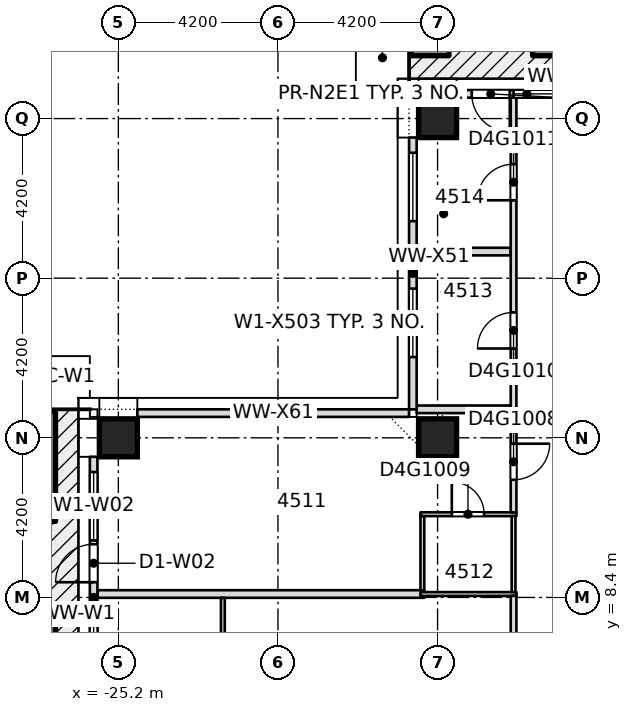
"""IFC4 building model, lengths in metres.
Left out: names, types, materials, properties, quantities, classifications, styles, units other than length and angle.
Written with IfcOpenShell. Run it as: python <this file> out.ifc"""

import sys

from ifc_helpers import new_model, si_unit, direction, frame, frame_2d, origin, origin_2d, place, context, subcontext, project, spatial, rectangle, extrude, element, fill, save


model = new_model("IFC4")
c1 = context("Model", 3, precision=1e-05, world=origin(), true_north=direction((0.0, 1.0)))
c2 = subcontext(c1, "Body", "Model", "MODEL_VIEW")
j1 = project(units=[si_unit("LENGTHUNIT", "METRE"), si_unit("PLANEANGLEUNIT", "RADIAN")], contexts=[c1])
p1 = place(None, origin())
s1 = spatial("IfcSite", under=j1, at=p1, CompositionType="ELEMENT")
p2 = place(p1, origin())
s2 = spatial("IfcBuilding", under=s1, at=p2, CompositionType="ELEMENT")
p3 = place(p2, frame((0.0, 0.0, 175.55)))
s3 = spatial("IfcBuildingStorey", under=s2, at=p3, CompositionType="ELEMENT", Elevation=175.55)
for number, where, z_axis, x_axis in (
    (1, (-25.2, 12.6, -0.4), (0.0, 0.0, 1.0), (1.0, 0.0, 0.0)),
    (2, (-16.8, 12.6, -0.4), (0.0, 0.0, 1.0), (1.0, 0.0, 0.0)),
    (3, (-16.8, 21.0, -0.4), (0.0, 0.0, 1.0), (1.0, 0.0, 0.0)),
):
    element("IfcColumn", number, at=place(p3, frame(where, z_axis=z_axis, x_axis=x_axis)), inside=s3, PredefinedType="COLUMN", context=c2, shape_type="SweptSolid", body=[
        extrude(rectangle(XDim=1.0, YDim=1.0, at=origin_2d()), origin(), (0.0, 0.0, 1.0), 3.45),
    ])
p4 = place(p3, frame((-25.75, 8.49, 0.0), z_axis=(0.0, 0.0, 1.0), x_axis=(1.0, 0.0, 0.0)))
e4 = element("IfcWall", 4, at=p4, inside=s3, PredefinedType="PARTITIONING", context=c2, shape_type="SweptSolid", body=[
    extrude(rectangle(XDim=8.6, YDim=0.2, at=frame_2d((4.3, 0.0))), origin(), (0.0, 0.0, 1.0), 3.05),
])
p5 = place(p3, frame((-17.25, 8.49, 0.0), z_axis=(0.0, 0.0, 1.0), x_axis=(1.0, 0.0, 0.0)))
e5 = element("IfcWall", 5, at=p5, inside=s3, PredefinedType="PARTITIONING", context=c2, shape_type="SweptSolid", body=[
    extrude(rectangle(XDim=2.525, YDim=0.1, at=frame_2d((1.262, 0.0))), origin(), (0.0, 0.0, 1.0), 3.05),
])
p6 = place(p3, frame((-17.25, 10.59, 0.0), z_axis=(0.0, 0.0, 1.0), x_axis=(1.0, 0.0, 0.0)))
e6 = element("IfcWall", 6, at=p6, inside=s3, PredefinedType="PARTITIONING", context=c2, shape_type="SweptSolid", body=[
    extrude(rectangle(XDim=2.525, YDim=0.1, at=frame_2d((1.262, 0.0))), origin(), (0.0, 0.0, 1.0), 3.05),
])
p7 = place(p6, frame((0.825, 0.0, 0.0)))
e7 = element("IfcOpeningElement", 7, at=p7, cuts=e6, PredefinedType="OPENING", context=c2, shape_type="SweptSolid", body=[
    extrude(rectangle(XDim=0.85, YDim=2.1, at=frame_2d((0.425, 1.05))), frame((0.0, 0.06, 0.0), z_axis=(0.0, -1.0, 0.0), x_axis=(1.0, 0.0, 0.0)), (0.0, 0.0, 1.0), 0.12),
])
for number, where, z_axis, x_axis in (
    (8, (-17.35, 13.35, 0.0), (0.0, 0.0, 1.0), (1.0, 0.0, 0.0)),
    (9, (-17.35, 17.5, 0.0), (0.0, 0.0, 1.0), (1.0, 0.0, 0.0)),
):
    element("IfcWall", number, at=place(p3, frame(where, z_axis=z_axis, x_axis=x_axis)), inside=s3, PredefinedType="PARTITIONING", context=c2, shape_type="SweptSolid", body=[
        extrude(rectangle(XDim=2.475, YDim=0.2, at=frame_2d((1.238, 0.0))), origin(), (0.0, 0.0, 1.0), 3.05),
    ])
p8 = place(p3, frame((-22.45, 5.0, 0.0), z_axis=(0.0, 0.0, 1.0), x_axis=(0.0, 1.0, 0.0)))
e10 = element("IfcWall", 10, at=p8, inside=s3, PredefinedType="PARTITIONING", context=c2, shape_type="SweptSolid", body=[
    extrude(rectangle(XDim=3.39, YDim=0.1, at=frame_2d((1.695, 0.0))), origin(), (0.0, 0.0, 1.0), 3.05),
])
p9 = place(p3, frame((-17.2, 8.59, 0.0), z_axis=(0.0, 0.0, 1.0), x_axis=(0.0, 1.0, 0.0)))
e11 = element("IfcWall", 11, at=p9, inside=s3, PredefinedType="PARTITIONING", context=c2, shape_type="SweptSolid", body=[
    extrude(rectangle(XDim=1.95, YDim=0.1, at=frame_2d((0.975, 0.0))), origin(), (0.0, 0.0, 1.0), 3.05),
])
p10 = place(p3, frame((-14.8, -10.525, 0.0), z_axis=(0.0, 0.0, 1.0), x_axis=(0.0, 1.0, 0.0)))
e12 = element("IfcWall", 12, at=p10, inside=s3, PredefinedType="PARTITIONING", context=c2, shape_type="SweptSolid", body=[
    extrude(rectangle(XDim=18.965, YDim=0.15, at=frame_2d((9.482, 0.0))), origin(), (0.0, 0.0, 1.0), 3.05),
])
p11 = place(p10, frame((0.925, 0.0, 0.0)))
e13 = element("IfcOpeningElement", 13, at=p11, cuts=e12, PredefinedType="OPENING", context=c2, shape_type="SweptSolid", body=[
    extrude(rectangle(XDim=1.0, YDim=2.1, at=frame_2d((0.5, 1.05))), frame((0.0, 0.085, 0.0), z_axis=(0.0, -1.0, 0.0), x_axis=(1.0, 0.0, 0.0)), (0.0, 0.0, 1.0), 0.17),
])
p12 = place(p10, frame((15.97, 0.0, 0.0)))
e14 = element("IfcOpeningElement", 14, at=p12, cuts=e12, PredefinedType="OPENING", context=c2, shape_type="SweptSolid", body=[
    extrude(rectangle(XDim=1.0, YDim=2.1, at=frame_2d((0.5, 1.05))), frame((0.0, 0.085, 0.0), z_axis=(0.0, -1.0, 0.0), x_axis=(1.0, 0.0, 0.0)), (0.0, 0.0, 1.0), 0.17),
])
p13 = place(p10, frame((9.975, 0.0, 0.0)))
e15 = element("IfcOpeningElement", 15, at=p13, cuts=e12, PredefinedType="OPENING", context=c2, shape_type="SweptSolid", body=[
    extrude(rectangle(XDim=1.1, YDim=2.1, at=frame_2d((0.55, 1.05))), frame((0.0, 0.085, 0.0), z_axis=(0.0, -1.0, 0.0), x_axis=(1.0, 0.0, 0.0)), (0.0, 0.0, 1.0), 0.17),
])
p14 = place(p10, frame((4.825, 0.0, 0.0)))
e16 = element("IfcOpeningElement", 16, at=p14, cuts=e12, PredefinedType="OPENING", context=c2, shape_type="SweptSolid", body=[
    extrude(rectangle(XDim=1.0, YDim=2.1, at=frame_2d((0.5, 1.05))), frame((0.0, 0.085, 0.0), z_axis=(0.0, -1.0, 0.0), x_axis=(1.0, 0.0, 0.0)), (0.0, 0.0, 1.0), 0.17),
])
p15 = place(p3, frame((-14.8, 8.54, 0.0), z_axis=(0.0, 0.0, 1.0), x_axis=(0.0, 1.0, 0.0)))
e17 = element("IfcWall", 17, at=p15, inside=s3, PredefinedType="PARTITIONING", context=c2, shape_type="SweptSolid", body=[
    extrude(rectangle(XDim=2.0, YDim=0.1, at=frame_2d((1.0, 0.0))), origin(), (0.0, 0.0, 1.0), 3.05),
])
p16 = place(p3, frame((-14.8, 10.64, 0.0), z_axis=(0.0, 0.0, 1.0), x_axis=(0.0, 1.0, 0.0)))
e18 = element("IfcWall", 18, at=p16, inside=s3, PredefinedType="PARTITIONING", context=c2, shape_type="SweptSolid", body=[
    extrude(rectangle(XDim=10.91, YDim=0.15, at=frame_2d((5.455, 0.0))), origin(), (0.0, 0.0, 1.0), 3.05),
])
p17 = place(p16, frame((0.855, 0.0, 0.0)))
e19 = element("IfcOpeningElement", 19, at=p17, cuts=e18, PredefinedType="OPENING", context=c2, shape_type="SweptSolid", body=[
    extrude(rectangle(XDim=0.95, YDim=2.1, at=frame_2d((0.475, 1.05))), frame((0.0, 0.085, 0.0), z_axis=(0.0, -1.0, 0.0), x_axis=(1.0, 0.0, 0.0)), (0.0, 0.0, 1.0), 0.17),
])
p18 = place(p16, frame((4.31, 0.0, 0.0)))
e20 = element("IfcOpeningElement", 20, at=p18, cuts=e18, PredefinedType="OPENING", context=c2, shape_type="SweptSolid", body=[
    extrude(rectangle(XDim=0.95, YDim=2.1, at=frame_2d((0.475, 1.05))), frame((0.0, 0.085, 0.0), z_axis=(0.0, -1.0, 0.0), x_axis=(1.0, 0.0, 0.0)), (0.0, 0.0, 1.0), 0.17),
])
p19 = place(p16, frame((8.21, 0.0, 0.0)))
e21 = element("IfcOpeningElement", 21, at=p19, cuts=e18, PredefinedType="OPENING", context=c2, shape_type="SweptSolid", body=[
    extrude(rectangle(XDim=0.95, YDim=2.1, at=frame_2d((0.475, 1.05))), frame((0.0, 0.085, 0.0), z_axis=(0.0, -1.0, 0.0), x_axis=(1.0, 0.0, 0.0)), (0.0, 0.0, 1.0), 0.17),
])
p20 = place(p3, frame((-12.6, 21.65, 0.0), z_axis=(0.0, 0.0, 1.0), x_axis=(-1.0, 0.0, 0.0)))
e22 = element("IfcWall", 22, at=p20, inside=s3, PredefinedType="STANDARD", context=c2, shape_type="SweptSolid", body=[
    extrude(rectangle(XDim=3.7, YDim=0.2, at=frame_2d((1.85, 0.0))), origin(), (0.0, 0.0, 1.0), 3.05),
])
p21 = place(p20, frame((0.4, 0.0, 0.2)))
e23 = element("IfcOpeningElement", 23, at=p21, cuts=e22, PredefinedType="OPENING", context=c2, shape_type="SweptSolid", body=[
    extrude(rectangle(XDim=1.8, YDim=2.65, at=frame_2d((0.9, 1.325))), frame((0.0, 0.11, 0.0), z_axis=(0.0, -1.0, 0.0), x_axis=(1.0, 0.0, 0.0)), (0.0, 0.0, 1.0), 0.22),
])
p22 = place(p20, frame((2.3, 0.0, 0.0)))
e24 = element("IfcOpeningElement", 24, at=p22, cuts=e22, PredefinedType="OPENING", context=c2, shape_type="SweptSolid", body=[
    extrude(rectangle(XDim=1.0, YDim=2.4, at=frame_2d((0.5, 1.2))), frame((0.0, 0.11, 0.0), z_axis=(0.0, -1.0, 0.0), x_axis=(1.0, 0.0, 0.0)), (0.0, 0.0, 1.0), 0.22),
])
p23 = place(p3, frame((-12.66, 22.954, -0.04), z_axis=(0.0, 0.0, 1.0), x_axis=(-1.0, 0.0, 0.0)))
e25 = element("IfcWall", 25, at=p23, inside=s3, PredefinedType="USERDEFINED", context=c2, shape_type="SweptSolid", body=[
    extrude(rectangle(XDim=1.64, YDim=0.6, at=frame_2d((0.82, 0.0))), origin(), (0.0, 0.0, 1.0), 1.2),
])
p24 = place(p3, frame((-16.5, 22.954, -0.04), z_axis=(0.0, 0.0, 1.0), x_axis=(-1.0, 0.0, 0.0)))
e26 = element("IfcWall", 26, at=p24, inside=s3, PredefinedType="USERDEFINED", context=c2, shape_type="SweptSolid", body=[
    extrude(rectangle(XDim=0.99, YDim=0.6, at=frame_2d((0.495, 0.0))), origin(), (0.0, 0.0, 1.0), 1.2),
])
p25 = place(p3, frame((-17.45, 20.5, 0.0), z_axis=(0.0, 0.0, 1.0), x_axis=(0.0, -1.0, 0.0)))
e27 = element("IfcWall", 27, at=p25, inside=s3, PredefinedType="STANDARD", context=c2, shape_type="SweptSolid", body=[
    extrude(rectangle(XDim=7.15, YDim=0.2, at=frame_2d((3.575, 0.0))), origin(), (0.0, 0.0, 1.0), 3.05),
])
p26 = place(p25, frame((3.975, 0.0, 0.2)))
e28 = element("IfcOpeningElement", 28, at=p26, cuts=e27, PredefinedType="OPENING", context=c2, shape_type="SweptSolid", body=[
    extrude(rectangle(XDim=1.8, YDim=2.65, at=frame_2d((0.9, 1.325))), frame((0.0, 0.11, 0.0), z_axis=(0.0, -1.0, 0.0), x_axis=(1.0, 0.0, 0.0)), (0.0, 0.0, 1.0), 0.22),
])
p27 = place(p25, frame((0.4, 0.0, 0.2)))
e29 = element("IfcOpeningElement", 29, at=p27, cuts=e27, PredefinedType="OPENING", context=c2, shape_type="SweptSolid", body=[
    extrude(rectangle(XDim=1.8, YDim=2.65, at=frame_2d((0.9, 1.325))), frame((0.0, 0.11, 0.0), z_axis=(0.0, -1.0, 0.0), x_axis=(1.0, 0.0, 0.0)), (0.0, 0.0, 1.0), 0.22),
])
p28 = place(p3, frame((-17.55, 13.25, 0.0), z_axis=(0.0, 0.0, 1.0), x_axis=(-1.0, 0.0, 0.0)))
e30 = element("IfcWall", 30, at=p28, inside=s3, PredefinedType="STANDARD", context=c2, shape_type="SweptSolid", body=[
    extrude(rectangle(XDim=7.15, YDim=0.2, at=frame_2d((3.575, 0.0))), origin(), (0.0, 0.0, 1.0), 3.05),
])
p29 = place(p3, frame((-25.85, 12.1, 0.0), z_axis=(0.0, 0.0, 1.0), x_axis=(0.0, -1.0, 0.0)))
e31 = element("IfcWall", 31, at=p29, inside=s3, PredefinedType="STANDARD", context=c2, shape_type="SweptSolid", body=[
    extrude(rectangle(XDim=7.4, YDim=0.2, at=frame_2d((3.7, 0.0))), origin(), (0.0, 0.0, 1.0), 3.05),
])
p30 = place(p29, frame((4.1, 0.0, 0.2)))
e32 = element("IfcOpeningElement", 32, at=p30, cuts=e31, PredefinedType="OPENING", context=c2, shape_type="SweptSolid", body=[
    extrude(rectangle(XDim=1.8, YDim=2.65, at=frame_2d((0.9, 1.325))), frame((0.0, 0.11, 0.0), z_axis=(0.0, -1.0, 0.0), x_axis=(1.0, 0.0, 0.0)), (0.0, 0.0, 1.0), 0.22),
])
p31 = place(p29, frame((6.0, 0.0, 0.0)))
e33 = element("IfcOpeningElement", 33, at=p31, cuts=e31, PredefinedType="OPENING", context=c2, shape_type="SweptSolid", body=[
    extrude(rectangle(XDim=1.0, YDim=2.4, at=frame_2d((0.5, 1.2))), frame((0.0, 0.11, 0.0), z_axis=(0.0, -1.0, 0.0), x_axis=(1.0, 0.0, 0.0)), (0.0, 0.0, 1.0), 0.22),
])
p32 = place(p29, frame((0.4, 0.0, 0.2)))
e34 = element("IfcOpeningElement", 34, at=p32, cuts=e31, PredefinedType="OPENING", context=c2, shape_type="SweptSolid", body=[
    extrude(rectangle(XDim=1.8, YDim=2.65, at=frame_2d((0.9, 1.325))), frame((0.0, 0.11, 0.0), z_axis=(0.0, -1.0, 0.0), x_axis=(1.0, 0.0, 0.0)), (0.0, 0.0, 1.0), 0.22),
])
p33 = place(p29, frame((2.3, 0.0, 0.0)))
e35 = element("IfcOpeningElement", 35, at=p33, cuts=e31, PredefinedType="OPENING", context=c2, shape_type="SweptSolid", body=[
    extrude(rectangle(XDim=1.0, YDim=2.4, at=frame_2d((0.5, 1.2))), frame((0.0, 0.11, 0.0), z_axis=(0.0, -1.0, 0.0), x_axis=(1.0, 0.0, 0.0)), (0.0, 0.0, 1.0), 0.22),
])
p34 = place(p3, frame((-27.154, 13.29, -0.04), z_axis=(0.0, 0.0, 1.0), x_axis=(0.0, -1.0, 0.0)))
e36 = element("IfcWall", 36, at=p34, inside=s3, PredefinedType="USERDEFINED", context=c2, shape_type="SweptSolid", body=[
    extrude(rectangle(XDim=2.89, YDim=0.6, at=frame_2d((1.445, 0.0))), origin(), (0.0, 0.0, 1.0), 1.2),
])
p35 = place(p3, frame((-27.154, 8.2, -0.04), z_axis=(0.0, 0.0, 1.0), x_axis=(0.0, -1.0, 0.0)))
e37 = element("IfcWall", 37, at=p35, inside=s3, PredefinedType="USERDEFINED", context=c2, shape_type="SweptSolid", body=[
    extrude(rectangle(XDim=1.5, YDim=0.6, at=frame_2d((0.75, 0.0))), origin(), (0.0, 0.0, 1.0), 1.2),
])
p36 = place(p17, origin())
e38 = element("IfcDoor", 38, at=p36, inside=s3, OperationType="SINGLE_SWING_LEFT", PredefinedType="DOOR", context=c2, shape_type="SweptSolid", body=[
    extrude(rectangle(XDim=0.95, YDim=2.1, at=frame_2d((0.475, 1.05))), frame((0.0, 0.025, 0.0), z_axis=(0.0, -1.0, 0.0), x_axis=(1.0, 0.0, 0.0)), (0.0, 0.0, 1.0), 0.05),
])
fill(e19, e38)
p37 = place(p7, origin())
e39 = element("IfcDoor", 39, at=p37, inside=s3, OperationType="SINGLE_SWING_RIGHT", PredefinedType="DOOR", context=c2, shape_type="SweptSolid", body=[
    extrude(rectangle(XDim=0.85, YDim=2.1, at=frame_2d((0.425, 1.05))), frame((0.0, 0.025, 0.0), z_axis=(0.0, -1.0, 0.0), x_axis=(1.0, 0.0, 0.0)), (0.0, 0.0, 1.0), 0.05),
])
fill(e7, e39)
p38 = place(p18, origin())
e40 = element("IfcDoor", 40, at=p38, inside=s3, OperationType="SINGLE_SWING_LEFT", PredefinedType="DOOR", context=c2, shape_type="SweptSolid", body=[
    extrude(rectangle(XDim=0.95, YDim=2.1, at=frame_2d((0.475, 1.05))), frame((0.0, 0.025, 0.0), z_axis=(0.0, -1.0, 0.0), x_axis=(1.0, 0.0, 0.0)), (0.0, 0.0, 1.0), 0.05),
])
fill(e20, e40)
p39 = place(p19, origin())
e41 = element("IfcDoor", 41, at=p39, inside=s3, OperationType="SINGLE_SWING_RIGHT", PredefinedType="DOOR", context=c2, shape_type="SweptSolid", body=[
    extrude(rectangle(XDim=0.95, YDim=2.1, at=frame_2d((0.475, 1.05))), frame((0.0, 0.025, 0.0), z_axis=(0.0, -1.0, 0.0), x_axis=(1.0, 0.0, 0.0)), (0.0, 0.0, 1.0), 0.05),
])
fill(e21, e41)
p40 = place(p21, origin())
e42 = element("IfcWindow", 42, at=p40, inside=s3, PartitioningType="SINGLE_PANEL", PredefinedType="WINDOW", context=c2, shape_type="SweptSolid", body=[
    extrude(rectangle(XDim=1.8, YDim=2.65, at=frame_2d((0.9, 1.325))), frame((0.0, 0.03, 0.0), z_axis=(0.0, -1.0, 0.0), x_axis=(1.0, 0.0, 0.0)), (0.0, 0.0, 1.0), 0.06),
])
fill(e23, e42)
p41 = place(p22, origin())
e43 = element("IfcDoor", 43, at=p41, inside=s3, OperationType="SINGLE_SWING_LEFT", PredefinedType="DOOR", context=c2, shape_type="SweptSolid", body=[
    extrude(rectangle(XDim=1.0, YDim=2.4, at=frame_2d((0.5, 1.2))), frame((0.0, 0.025, 0.0), z_axis=(0.0, -1.0, 0.0), x_axis=(1.0, 0.0, 0.0)), (0.0, 0.0, 1.0), 0.05),
])
fill(e24, e43)
p42 = place(p26, origin())
e44 = element("IfcWindow", 44, at=p42, inside=s3, PartitioningType="SINGLE_PANEL", PredefinedType="WINDOW", context=c2, shape_type="SweptSolid", body=[
    extrude(rectangle(XDim=1.8, YDim=2.65, at=frame_2d((0.9, 1.325))), frame((0.0, 0.03, 0.0), z_axis=(0.0, -1.0, 0.0), x_axis=(1.0, 0.0, 0.0)), (0.0, 0.0, 1.0), 0.06),
])
fill(e28, e44)
p43 = place(p27, origin())
e45 = element("IfcWindow", 45, at=p43, inside=s3, PartitioningType="SINGLE_PANEL", PredefinedType="WINDOW", context=c2, shape_type="SweptSolid", body=[
    extrude(rectangle(XDim=1.8, YDim=2.65, at=frame_2d((0.9, 1.325))), frame((0.0, 0.03, 0.0), z_axis=(0.0, -1.0, 0.0), x_axis=(1.0, 0.0, 0.0)), (0.0, 0.0, 1.0), 0.06),
])
fill(e29, e45)
p44 = place(p30, origin())
e46 = element("IfcWindow", 46, at=p44, inside=s3, PartitioningType="SINGLE_PANEL", PredefinedType="WINDOW", context=c2, shape_type="SweptSolid", body=[
    extrude(rectangle(XDim=1.8, YDim=2.65, at=frame_2d((0.9, 1.325))), frame((0.0, 0.03, 0.0), z_axis=(0.0, -1.0, 0.0), x_axis=(1.0, 0.0, 0.0)), (0.0, 0.0, 1.0), 0.06),
])
fill(e32, e46)
p45 = place(p32, origin())
e47 = element("IfcWindow", 47, at=p45, inside=s3, PartitioningType="SINGLE_PANEL", PredefinedType="WINDOW", context=c2, shape_type="SweptSolid", body=[
    extrude(rectangle(XDim=1.8, YDim=2.65, at=frame_2d((0.9, 1.325))), frame((0.0, 0.03, 0.0), z_axis=(0.0, -1.0, 0.0), x_axis=(1.0, 0.0, 0.0)), (0.0, 0.0, 1.0), 0.06),
])
fill(e34, e47)
p46 = place(p33, origin())
e48 = element("IfcDoor", 48, at=p46, inside=s3, OperationType="SINGLE_SWING_LEFT", PredefinedType="DOOR", context=c2, shape_type="SweptSolid", body=[
    extrude(rectangle(XDim=1.0, YDim=2.4, at=frame_2d((0.5, 1.2))), frame((0.0, 0.025, 0.0), z_axis=(0.0, -1.0, 0.0), x_axis=(1.0, 0.0, 0.0)), (0.0, 0.0, 1.0), 0.05),
])
fill(e35, e48)
save(model, sys.argv[1])
